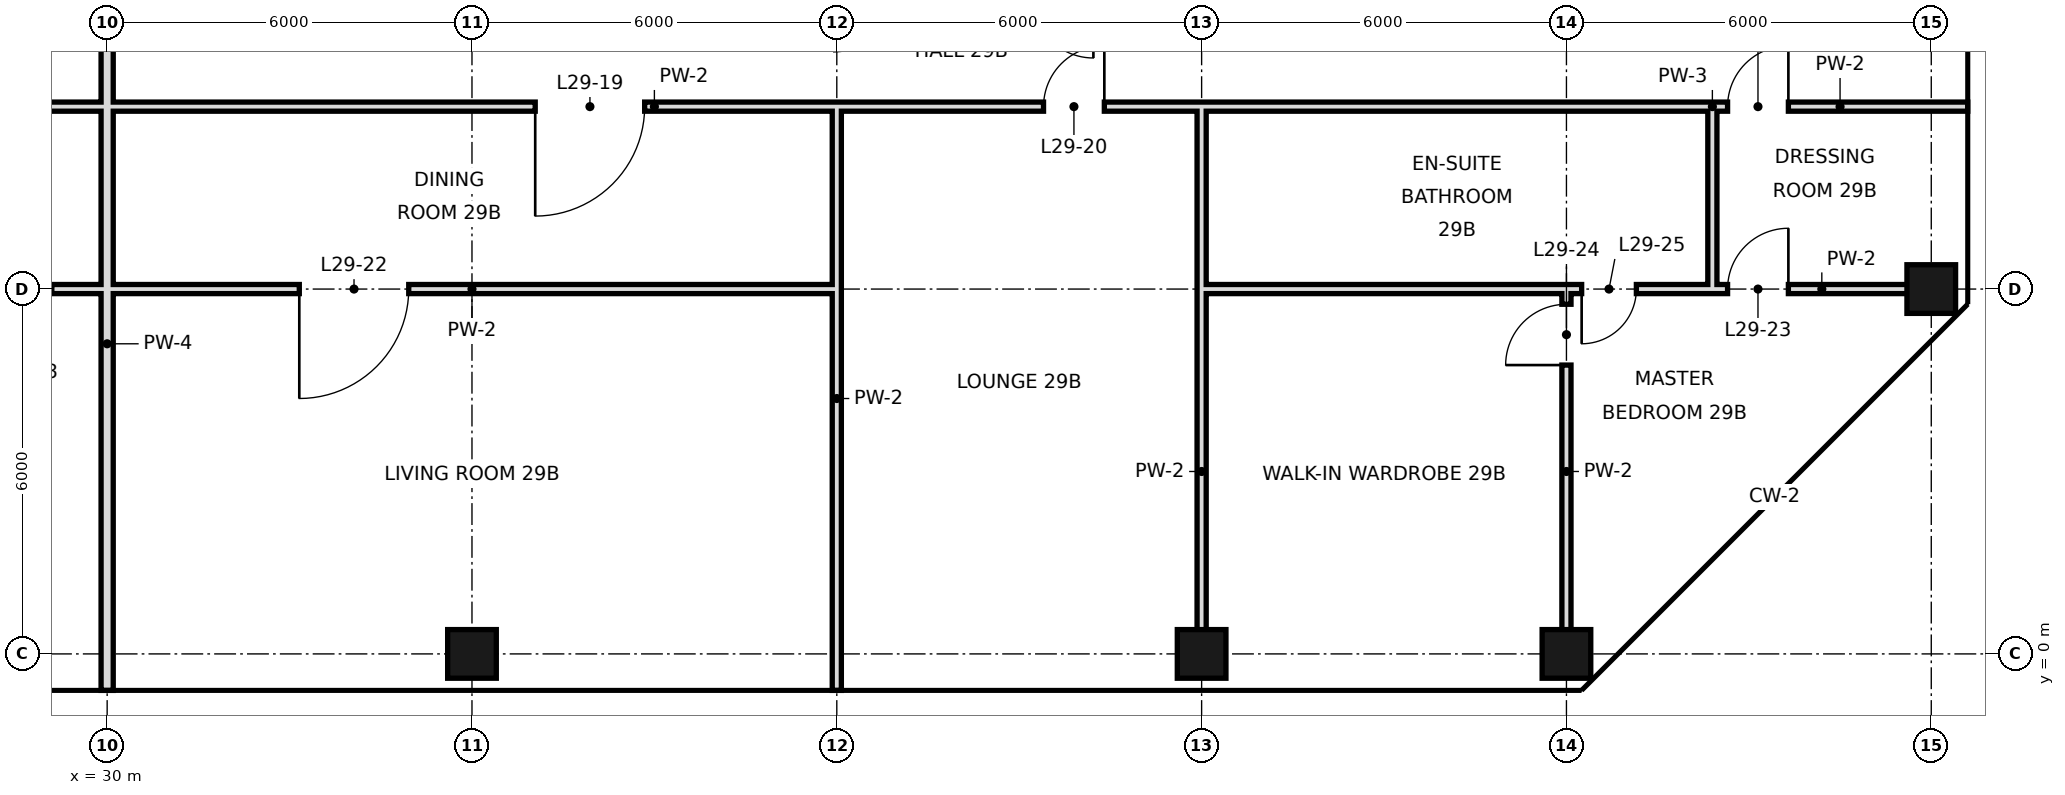
"""IFC4 building model, lengths in metres.
Left out: names, types, materials, properties, quantities, classifications, styles, units other than length and angle.
Written with IfcOpenShell. Run it as: python <this file> out.ifc"""

import sys

from ifc_helpers import new_model, si_unit, direction, frame, frame_2d, origin, origin_2d, place, context, subcontext, project, spatial, rectangle, hollow_rectangle, extrude, element, fill, save


model = new_model("IFC4")
c1 = context("Model", 3, precision=1e-05, world=origin(), true_north=direction((0.0, 1.0)))
c2 = subcontext(c1, "Body", "Model", "MODEL_VIEW")
j1 = project(units=[si_unit("LENGTHUNIT", "METRE"), si_unit("PLANEANGLEUNIT", "RADIAN")], contexts=[c1])
p1 = place(None, origin())
s1 = spatial("IfcSite", under=j1, at=p1, CompositionType="ELEMENT")
p2 = place(p1, origin())
s2 = spatial("IfcBuilding", under=s1, at=p2, CompositionType="ELEMENT")
p3 = place(p2, frame((0.0, 0.0, 130.4)))
s3 = spatial("IfcBuildingStorey", under=s2, at=p3, CompositionType="ELEMENT", Elevation=130.4)
for number, where, z_axis, x_axis in (
    (1, (36.0, 0.0, 0.0), (0.0, 0.0, 1.0), (1.0, 0.0, 0.0)),
    (2, (48.0, 0.0, 0.0), (0.0, 0.0, 1.0), (1.0, 0.0, 0.0)),
    (3, (54.0, 0.0, 0.0), (0.0, 0.0, 1.0), (1.0, 0.0, 0.0)),
    (4, (60.0, 6.0, 0.0), (0.0, 0.0, 1.0), (1.0, 0.0, 0.0)),
):
    element("IfcColumn", number, at=place(p3, frame(where, z_axis=z_axis, x_axis=x_axis)), inside=s3, PredefinedType="COLUMN", context=c2, shape_type="SweptSolid", body=[
        extrude(hollow_rectangle(XDim=0.8, YDim=0.8, WallThickness=0.04, at=origin_2d()), origin(), (0.0, 0.0, 1.0), 3.6),
    ])
p4 = place(p3, frame((30.0, -0.6, 0.0), z_axis=(0.0, 0.0, 1.0), x_axis=(0.0, 1.0, 0.0)))
e5 = element("IfcWall", 5, at=p4, inside=s3, PredefinedType="SOLIDWALL", context=c2, shape_type="SweptSolid", body=[
    extrude(rectangle(XDim=11.4, YDim=0.2, at=frame_2d((5.7, 0.0))), origin(), (0.0, 0.0, 1.0), 2.72),
])
p5 = place(p3, frame((42.0, -0.6, 0.0), z_axis=(0.0, 0.0, 1.0), x_axis=(0.0, 1.0, 0.0)))
e6 = element("IfcWall", 6, at=p5, inside=s3, PredefinedType="PARTITIONING", context=c2, shape_type="SweptSolid", body=[
    extrude(rectangle(XDim=9.6, YDim=0.15, at=frame_2d((4.8, 0.0))), origin(), (0.0, 0.0, 1.0), 3.42),
])
p6 = place(p3, frame((48.0, 0.0, 0.0), z_axis=(0.0, 0.0, 1.0), x_axis=(0.0, 1.0, 0.0)))
e7 = element("IfcWall", 7, at=p6, inside=s3, PredefinedType="PARTITIONING", context=c2, shape_type="SweptSolid", body=[
    extrude(rectangle(XDim=6.0, YDim=0.15, at=frame_2d((3.0, 0.0))), origin(), (0.0, 0.0, 1.0), 2.72),
])
p7 = place(p3, frame((48.0, 6.0, 0.0), z_axis=(0.0, 0.0, 1.0), x_axis=(0.0, 1.0, 0.0)))
e8 = element("IfcWall", 8, at=p7, inside=s3, PredefinedType="PARTITIONING", context=c2, shape_type="SweptSolid", body=[
    extrude(rectangle(XDim=3.0, YDim=0.15, at=frame_2d((1.5, 0.0))), origin(), (0.0, 0.0, 1.0), 2.72),
])
p8 = place(p3, frame((54.0, 0.0, 0.0), z_axis=(0.0, 0.0, 1.0), x_axis=(0.0, 1.0, 0.0)))
e9 = element("IfcWall", 9, at=p8, inside=s3, PredefinedType="PARTITIONING", context=c2, shape_type="SweptSolid", body=[
    extrude(rectangle(XDim=6.0, YDim=0.15, at=frame_2d((3.0, 0.0))), origin(), (0.0, 0.0, 1.0), 3.42),
])
p9 = place(p8, frame((4.75, 0.0, 0.0)))
e10 = element("IfcOpeningElement", 10, at=p9, cuts=e9, PredefinedType="OPENING", context=c2, shape_type="SweptSolid", body=[
    extrude(rectangle(XDim=1.0, YDim=2.4, at=frame_2d((0.5, 1.2))), frame((0.0, 0.085, 0.0), z_axis=(0.0, -1.0, 0.0), x_axis=(1.0, 0.0, 0.0)), (0.0, 0.0, 1.0), 0.17),
])
p10 = place(p3, frame((56.4, 6.0, 0.0), z_axis=(0.0, 0.0, 1.0), x_axis=(0.0, 1.0, 0.0)))
e11 = element("IfcWall", 11, at=p10, inside=s3, PredefinedType="PARTITIONING", context=c2, shape_type="SweptSolid", body=[
    extrude(rectangle(XDim=3.0, YDim=0.15, at=frame_2d((1.5, 0.0))), origin(), (0.0, 0.0, 1.0), 3.42),
])
p11 = place(p3, frame((30.0, 6.0, 0.0), z_axis=(0.0, 0.0, 1.0), x_axis=(1.0, 0.0, 0.0)))
e12 = element("IfcWall", 12, at=p11, inside=s3, PredefinedType="PARTITIONING", context=c2, shape_type="SweptSolid", body=[
    extrude(rectangle(XDim=12.0, YDim=0.15, at=frame_2d((6.0, 0.0))), origin(), (0.0, 0.0, 1.0), 2.72),
])
p12 = place(p11, frame((3.16, 0.0, 0.0)))
e13 = element("IfcOpeningElement", 13, at=p12, cuts=e12, PredefinedType="OPENING", context=c2, shape_type="SweptSolid", body=[
    extrude(rectangle(XDim=1.8, YDim=2.4, at=frame_2d((0.9, 1.2))), frame((0.0, 0.085, 0.0), z_axis=(0.0, -1.0, 0.0), x_axis=(1.0, 0.0, 0.0)), (0.0, 0.0, 1.0), 0.17),
])
p13 = place(p3, frame((56.4, 6.0, 0.0), z_axis=(0.0, 0.0, 1.0), x_axis=(1.0, 0.0, 0.0)))
e14 = element("IfcWall", 14, at=p13, inside=s3, PredefinedType="PARTITIONING", context=c2, shape_type="SweptSolid", body=[
    extrude(rectangle(XDim=3.6, YDim=0.15, at=frame_2d((1.8, 0.0))), origin(), (0.0, 0.0, 1.0), 2.72),
])
p14 = place(p13, frame((0.25, 0.0, 0.0)))
e15 = element("IfcOpeningElement", 15, at=p14, cuts=e14, PredefinedType="OPENING", context=c2, shape_type="SweptSolid", body=[
    extrude(rectangle(XDim=1.0, YDim=2.4, at=frame_2d((0.5, 1.2))), frame((0.0, 0.085, 0.0), z_axis=(0.0, -1.0, 0.0), x_axis=(1.0, 0.0, 0.0)), (0.0, 0.0, 1.0), 0.17),
])
p15 = place(p3, frame((26.4, 6.0, 0.0), z_axis=(0.0, 0.0, 1.0), x_axis=(1.0, 0.0, 0.0)))
e16 = element("IfcWall", 16, at=p15, inside=s3, PredefinedType="PARTITIONING", context=c2, shape_type="SweptSolid", body=[
    extrude(rectangle(XDim=3.6, YDim=0.15, at=frame_2d((1.8, 0.0))), origin(), (0.0, 0.0, 1.0), 2.97),
])
p16 = place(p15, frame((1.79, 0.0, 0.0)))
e17 = element("IfcOpeningElement", 17, at=p16, cuts=e16, PredefinedType="OPENING", context=c2, shape_type="SweptSolid", body=[
    extrude(rectangle(XDim=0.9, YDim=2.4, at=frame_2d((0.45, 1.2))), frame((0.0, 0.085, 0.0), z_axis=(0.0, -1.0, 0.0), x_axis=(1.0, 0.0, 0.0)), (0.0, 0.0, 1.0), 0.17),
])
p17 = place(p3, frame((48.0, 6.0, 0.0), z_axis=(0.0, 0.0, 1.0), x_axis=(1.0, 0.0, 0.0)))
e18 = element("IfcWall", 18, at=p17, inside=s3, PredefinedType="PARTITIONING", context=c2, shape_type="SweptSolid", body=[
    extrude(rectangle(XDim=8.4, YDim=0.15, at=frame_2d((4.2, 0.0))), origin(), (0.0, 0.0, 1.0), 2.72),
])
p18 = place(p17, frame((6.25, 0.0, 0.0)))
e19 = element("IfcOpeningElement", 19, at=p18, cuts=e18, PredefinedType="OPENING", context=c2, shape_type="SweptSolid", body=[
    extrude(rectangle(XDim=0.9, YDim=2.4, at=frame_2d((0.45, 1.2))), frame((0.0, 0.085, 0.0), z_axis=(0.0, -1.0, 0.0), x_axis=(1.0, 0.0, 0.0)), (0.0, 0.0, 1.0), 0.17),
])
p19 = place(p3, frame((30.0, 9.0, 0.0), z_axis=(0.0, 0.0, 1.0), x_axis=(1.0, 0.0, 0.0)))
e20 = element("IfcWall", 20, at=p19, inside=s3, PredefinedType="PARTITIONING", context=c2, shape_type="SweptSolid", body=[
    extrude(rectangle(XDim=18.0, YDim=0.15, at=frame_2d((9.0, 0.0))), origin(), (0.0, 0.0, 1.0), 3.42),
])
p20 = place(p19, frame((7.04, 0.0, 0.0)))
e21 = element("IfcOpeningElement", 21, at=p20, cuts=e20, PredefinedType="OPENING", context=c2, shape_type="SweptSolid", body=[
    extrude(rectangle(XDim=1.8, YDim=2.4, at=frame_2d((0.9, 1.2))), frame((0.0, 0.085, 0.0), z_axis=(0.0, -1.0, 0.0), x_axis=(1.0, 0.0, 0.0)), (0.0, 0.0, 1.0), 0.17),
])
p21 = place(p19, frame((15.4, 0.0, 0.0)))
e22 = element("IfcOpeningElement", 22, at=p21, cuts=e20, PredefinedType="OPENING", context=c2, shape_type="SweptSolid", body=[
    extrude(rectangle(XDim=1.0, YDim=2.4, at=frame_2d((0.5, 1.2))), frame((0.0, 0.085, 0.0), z_axis=(0.0, -1.0, 0.0), x_axis=(1.0, 0.0, 0.0)), (0.0, 0.0, 1.0), 0.17),
])
p22 = place(p3, frame((56.4, 9.0, 0.0), z_axis=(0.0, 0.0, 1.0), x_axis=(1.0, 0.0, 0.0)))
e23 = element("IfcWall", 23, at=p22, inside=s3, PredefinedType="PARTITIONING", context=c2, shape_type="SweptSolid", body=[
    extrude(rectangle(XDim=4.2, YDim=0.15, at=frame_2d((2.1, 0.0))), origin(), (0.0, 0.0, 1.0), 3.42),
])
p23 = place(p22, frame((0.25, 0.0, 0.0)))
e24 = element("IfcOpeningElement", 24, at=p23, cuts=e23, PredefinedType="OPENING", context=c2, shape_type="SweptSolid", body=[
    extrude(rectangle(XDim=1.0, YDim=2.4, at=frame_2d((0.5, 1.2))), frame((0.0, 0.085, 0.0), z_axis=(0.0, -1.0, 0.0), x_axis=(1.0, 0.0, 0.0)), (0.0, 0.0, 1.0), 0.17),
])
p24 = place(p3, frame((26.4, 9.0, 0.0), z_axis=(0.0, 0.0, 1.0), x_axis=(1.0, 0.0, 0.0)))
e25 = element("IfcWall", 25, at=p24, inside=s3, PredefinedType="PARTITIONING", context=c2, shape_type="SweptSolid", body=[
    extrude(rectangle(XDim=3.6, YDim=0.15, at=frame_2d((1.8, 0.0))), origin(), (0.0, 0.0, 1.0), 3.42),
])
p25 = place(p3, frame((48.0, 9.0, 0.0), z_axis=(0.0, 0.0, 1.0), x_axis=(1.0, 0.0, 0.0)))
e26 = element("IfcWall", 26, at=p25, inside=s3, PredefinedType="PARTITIONING", context=c2, shape_type="SweptSolid", body=[
    extrude(rectangle(XDim=8.4, YDim=0.15, at=frame_2d((4.2, 0.0))), origin(), (0.0, 0.0, 1.0), 3.42),
])
p26 = place(p20, frame((1.8, 0.0, 0.0), z_axis=(0.0, 0.0, 1.0), x_axis=(-1.0, 0.0, 0.0)))
e27 = element("IfcDoor", 27, at=p26, inside=s3, OperationType="SINGLE_SWING_RIGHT", PredefinedType="DOOR", context=c2, shape_type="SweptSolid", body=[
    extrude(rectangle(XDim=1.8, YDim=2.4, at=frame_2d((0.9, 1.2))), frame((0.0, 0.025, 0.0), z_axis=(0.0, -1.0, 0.0), x_axis=(1.0, 0.0, 0.0)), (0.0, 0.0, 1.0), 0.05),
])
fill(e21, e27)
p27 = place(p21, frame((1.0, 0.0, 0.0), z_axis=(0.0, 0.0, 1.0), x_axis=(-1.0, 0.0, 0.0)))
e28 = element("IfcDoor", 28, at=p27, inside=s3, OperationType="SINGLE_SWING_LEFT", PredefinedType="DOOR", context=c2, shape_type="SweptSolid", body=[
    extrude(rectangle(XDim=1.0, YDim=2.4, at=frame_2d((0.5, 1.2))), frame((0.0, 0.025, 0.0), z_axis=(0.0, -1.0, 0.0), x_axis=(1.0, 0.0, 0.0)), (0.0, 0.0, 1.0), 0.05),
])
fill(e22, e28)
p28 = place(p23, frame((1.0, 0.0, 0.0), z_axis=(0.0, 0.0, 1.0), x_axis=(-1.0, 0.0, 0.0)))
e29 = element("IfcDoor", 29, at=p28, inside=s3, OperationType="SINGLE_SWING_LEFT", PredefinedType="DOOR", context=c2, shape_type="SweptSolid", body=[
    extrude(rectangle(XDim=1.0, YDim=2.4, at=frame_2d((0.5, 1.2))), frame((0.0, 0.025, 0.0), z_axis=(0.0, -1.0, 0.0), x_axis=(1.0, 0.0, 0.0)), (0.0, 0.0, 1.0), 0.05),
])
fill(e24, e29)
p29 = place(p12, frame((1.8, 0.0, 0.0), z_axis=(0.0, 0.0, 1.0), x_axis=(-1.0, 0.0, 0.0)))
e30 = element("IfcDoor", 30, at=p29, inside=s3, OperationType="SINGLE_SWING_RIGHT", PredefinedType="DOOR", context=c2, shape_type="SweptSolid", body=[
    extrude(rectangle(XDim=1.8, YDim=2.4, at=frame_2d((0.9, 1.2))), frame((0.0, 0.025, 0.0), z_axis=(0.0, -1.0, 0.0), x_axis=(1.0, 0.0, 0.0)), (0.0, 0.0, 1.0), 0.05),
])
fill(e13, e30)
p30 = place(p14, frame((1.0, 0.0, 0.0), z_axis=(0.0, 0.0, 1.0), x_axis=(-1.0, 0.0, 0.0)))
e31 = element("IfcDoor", 31, at=p30, inside=s3, OperationType="SINGLE_SWING_LEFT", PredefinedType="DOOR", context=c2, shape_type="SweptSolid", body=[
    extrude(rectangle(XDim=1.0, YDim=2.4, at=frame_2d((0.5, 1.2))), frame((0.0, 0.025, 0.0), z_axis=(0.0, -1.0, 0.0), x_axis=(1.0, 0.0, 0.0)), (0.0, 0.0, 1.0), 0.05),
])
fill(e15, e31)
p31 = place(p9, origin())
e32 = element("IfcDoor", 32, at=p31, inside=s3, OperationType="SINGLE_SWING_LEFT", PredefinedType="DOOR", context=c2, shape_type="SweptSolid", body=[
    extrude(rectangle(XDim=1.0, YDim=2.4, at=frame_2d((0.5, 1.2))), frame((0.0, 0.025, 0.0), z_axis=(0.0, -1.0, 0.0), x_axis=(1.0, 0.0, 0.0)), (0.0, 0.0, 1.0), 0.05),
])
fill(e10, e32)
p32 = place(p18, frame((0.9, 0.0, 0.0), z_axis=(0.0, 0.0, 1.0), x_axis=(-1.0, 0.0, 0.0)))
e33 = element("IfcDoor", 33, at=p32, inside=s3, OperationType="SINGLE_SWING_RIGHT", PredefinedType="DOOR", context=c2, shape_type="SweptSolid", body=[
    extrude(rectangle(XDim=0.9, YDim=2.4, at=frame_2d((0.45, 1.2))), frame((0.0, 0.025, 0.0), z_axis=(0.0, -1.0, 0.0), x_axis=(1.0, 0.0, 0.0)), (0.0, 0.0, 1.0), 0.05),
])
fill(e19, e33)
save(model, sys.argv[1])
